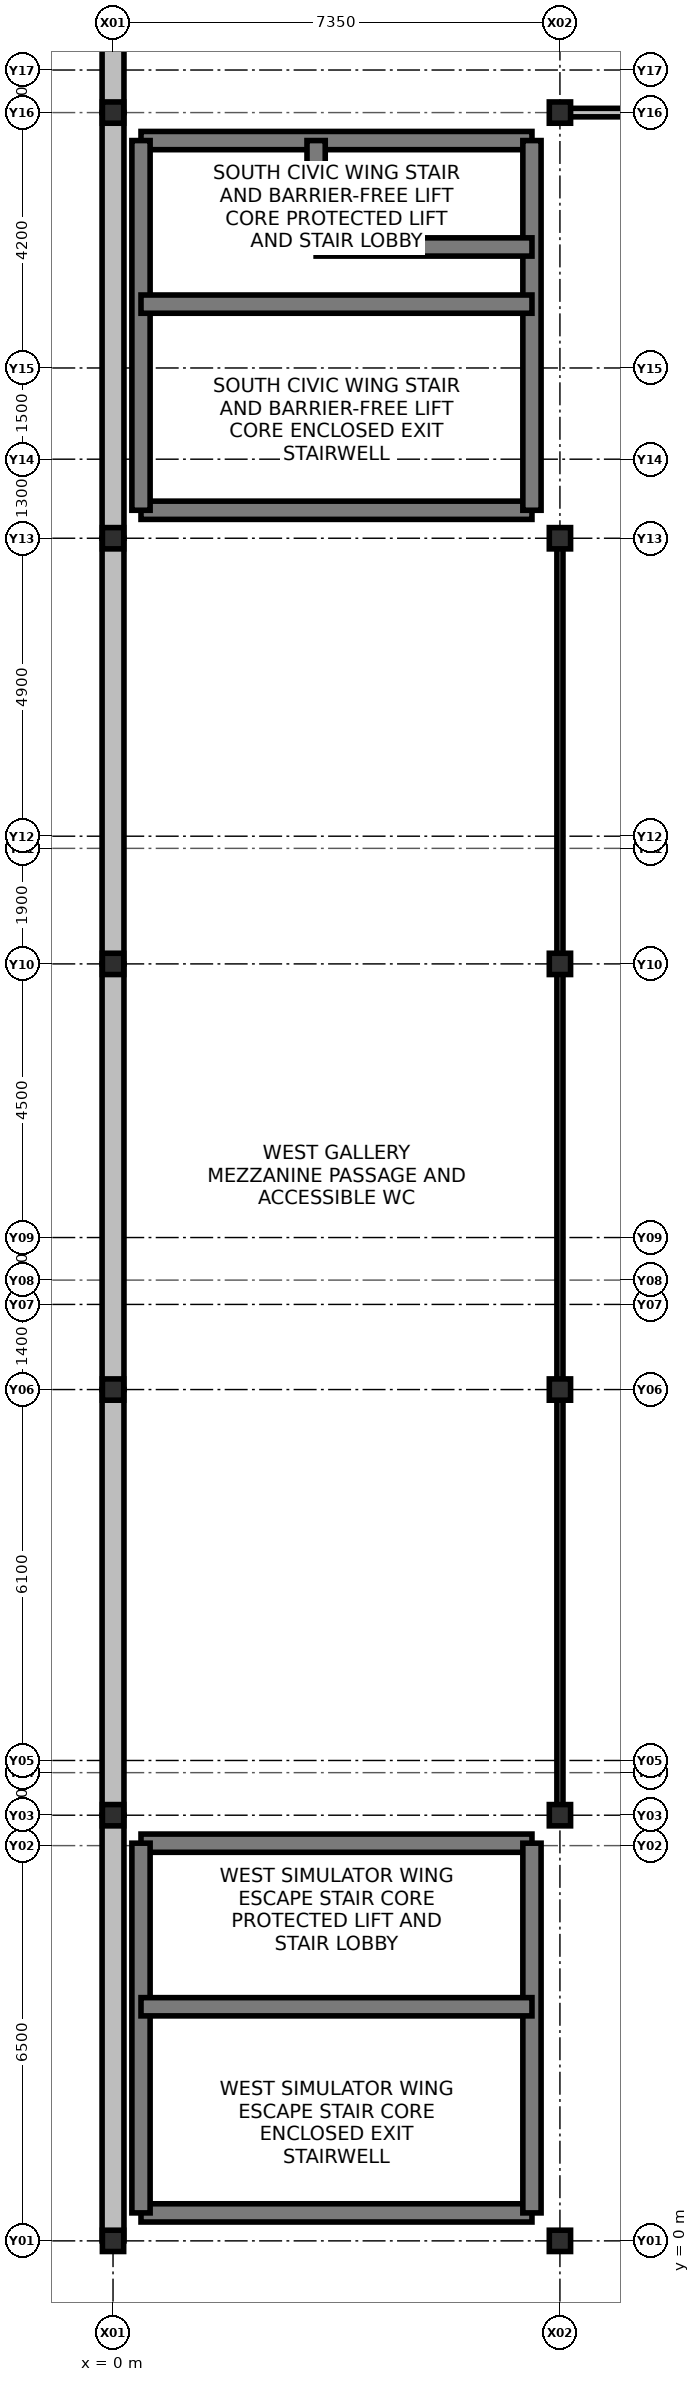
"""IFC4 building model, lengths in metres.
Left out: names, types, materials, properties, quantities, classifications, styles, units other than length and angle.
Written with IfcOpenShell. Run it as: python <this file> out.ifc"""

import sys

from ifc_helpers import new_model, si_unit, direction, frame, frame_2d, origin, origin_2d, place, context, subcontext, project, spatial, rectangle, i_section, extrude, element, fill, save


model = new_model("IFC4")
c1 = context("Model", 3, precision=1e-05, world=origin(), true_north=direction((0.0, 1.0)))
c2 = subcontext(c1, "Body", "Model", "MODEL_VIEW")
j1 = project(units=[si_unit("LENGTHUNIT", "METRE"), si_unit("PLANEANGLEUNIT", "RADIAN")], contexts=[c1])
p1 = place(None, origin())
s1 = spatial("IfcSite", under=j1, at=p1, CompositionType="ELEMENT")
p2 = place(p1, origin())
s2 = spatial("IfcBuilding", under=s1, at=p2, CompositionType="ELEMENT")
p3 = place(p2, frame((0.0, 0.0, 6.0)))
s3 = spatial("IfcBuildingStorey", under=s2, at=p3, CompositionType="ELEMENT", Elevation=6.0)
for number, where, z_axis, x_axis in (
    (1, (0.0, 0.0, 0.0), (0.0, 0.0, 1.0), (1.0, 0.0, 0.0)),
    (2, (0.0, 7.0, 0.0), (0.0, 0.0, 1.0), (1.0, 0.0, 0.0)),
    (3, (0.0, 14.0, 0.0), (0.0, 0.0, 1.0), (1.0, 0.0, 0.0)),
    (4, (0.0, 21.0, 0.0), (0.0, 0.0, 1.0), (1.0, 0.0, 0.0)),
    (5, (0.0, 28.0, 0.0), (0.0, 0.0, 1.0), (1.0, 0.0, 0.0)),
    (6, (0.0, 35.0, 0.0), (0.0, 0.0, 1.0), (1.0, 0.0, 0.0)),
    (7, (7.35, 0.0, 0.0), (0.0, 0.0, 1.0), (1.0, 0.0, 0.0)),
    (8, (7.35, 7.0, 0.0), (0.0, 0.0, 1.0), (1.0, 0.0, 0.0)),
    (9, (7.35, 14.0, 0.0), (0.0, 0.0, 1.0), (1.0, 0.0, 0.0)),
    (10, (7.35, 21.0, 0.0), (0.0, 0.0, 1.0), (1.0, 0.0, 0.0)),
    (11, (7.35, 28.0, 0.0), (0.0, 0.0, 1.0), (1.0, 0.0, 0.0)),
    (12, (7.35, 35.0, 0.0), (0.0, 0.0, 1.0), (1.0, 0.0, 0.0)),
):
    element("IfcColumn", number, at=place(p3, frame(where, z_axis=z_axis, x_axis=x_axis)), inside=s3, PredefinedType="COLUMN", context=c2, shape_type="SweptSolid", body=[
        extrude(i_section(OverallWidth=0.35, OverallDepth=0.35, WebThickness=0.012, FlangeThickness=0.019, at=origin_2d()), origin(), (0.0, 0.0, 1.0), 5.1),
    ])
p4 = place(p3, frame((0.0, 0.0, 0.0), z_axis=(0.0, 0.0, 1.0), x_axis=(0.0, 1.0, 0.0)))
e13 = element("IfcWall", 13, at=p4, inside=s3, PredefinedType="SOLIDWALL", context=c2, shape_type="SweptSolid", body=[
    extrude(rectangle(XDim=7.0, YDim=0.36, at=frame_2d((3.5, 0.0))), origin(), (0.0, 0.0, 1.0), 4.25),
])
p5 = place(p4, frame((2.2, 0.0, 0.95)))
e14 = element("IfcOpeningElement", 14, at=p5, cuts=e13, PredefinedType="OPENING", context=c2, shape_type="SweptSolid", body=[
    extrude(rectangle(XDim=2.15, YDim=1.9, at=frame_2d((1.075, 0.95))), frame((0.0, 0.19, 0.0), z_axis=(0.0, -1.0, 0.0), x_axis=(1.0, 0.0, 0.0)), (0.0, 0.0, 1.0), 0.38),
])
p6 = place(p3, frame((0.0, 7.0, 0.0), z_axis=(0.0, 0.0, 1.0), x_axis=(0.0, 1.0, 0.0)))
e15 = element("IfcWall", 15, at=p6, inside=s3, PredefinedType="SOLIDWALL", context=c2, shape_type="SweptSolid", body=[
    extrude(rectangle(XDim=7.0, YDim=0.36, at=frame_2d((3.5, 0.0))), origin(), (0.0, 0.0, 1.0), 4.25),
])
p7 = place(p6, frame((2.2, 0.0, 0.95)))
e16 = element("IfcOpeningElement", 16, at=p7, cuts=e15, PredefinedType="OPENING", context=c2, shape_type="SweptSolid", body=[
    extrude(rectangle(XDim=2.85, YDim=1.85, at=frame_2d((1.425, 0.925))), frame((0.0, 0.19, 0.0), z_axis=(0.0, -1.0, 0.0), x_axis=(1.0, 0.0, 0.0)), (0.0, 0.0, 1.0), 0.38),
])
p8 = place(p3, frame((0.0, 14.0, 0.0), z_axis=(0.0, 0.0, 1.0), x_axis=(0.0, 1.0, 0.0)))
e17 = element("IfcWall", 17, at=p8, inside=s3, PredefinedType="SOLIDWALL", context=c2, shape_type="SweptSolid", body=[
    extrude(rectangle(XDim=7.0, YDim=0.36, at=frame_2d((3.5, 0.0))), origin(), (0.0, 0.0, 1.0), 4.25),
])
p9 = place(p8, frame((2.2, 0.0, 0.95)))
e18 = element("IfcOpeningElement", 18, at=p9, cuts=e17, PredefinedType="OPENING", context=c2, shape_type="SweptSolid", body=[
    extrude(rectangle(XDim=3.5, YDim=2.0, at=frame_2d((1.75, 1.0))), frame((0.0, 0.19, 0.0), z_axis=(0.0, -1.0, 0.0), x_axis=(1.0, 0.0, 0.0)), (0.0, 0.0, 1.0), 0.38),
])
p10 = place(p3, frame((0.0, 21.0, 0.0), z_axis=(0.0, 0.0, 1.0), x_axis=(0.0, 1.0, 0.0)))
e19 = element("IfcWall", 19, at=p10, inside=s3, PredefinedType="SOLIDWALL", context=c2, shape_type="SweptSolid", body=[
    extrude(rectangle(XDim=7.0, YDim=0.36, at=frame_2d((3.5, 0.0))), origin(), (0.0, 0.0, 1.0), 4.25),
])
p11 = place(p10, frame((2.2, 0.0, 0.95)))
e20 = element("IfcOpeningElement", 20, at=p11, cuts=e19, PredefinedType="OPENING", context=c2, shape_type="SweptSolid", body=[
    extrude(rectangle(XDim=1.8, YDim=1.8, at=frame_2d((0.9, 0.9))), frame((0.0, 0.19, 0.0), z_axis=(0.0, -1.0, 0.0), x_axis=(1.0, 0.0, 0.0)), (0.0, 0.0, 1.0), 0.38),
])
p12 = place(p3, frame((0.0, 28.0, 0.0), z_axis=(0.0, 0.0, 1.0), x_axis=(0.0, 1.0, 0.0)))
e21 = element("IfcWall", 21, at=p12, inside=s3, PredefinedType="SOLIDWALL", context=c2, shape_type="SweptSolid", body=[
    extrude(rectangle(XDim=7.0, YDim=0.36, at=frame_2d((3.5, 0.0))), origin(), (0.0, 0.0, 1.0), 4.25),
])
p13 = place(p12, frame((2.2, 0.0, 0.95)))
e22 = element("IfcOpeningElement", 22, at=p13, cuts=e21, PredefinedType="OPENING", context=c2, shape_type="SweptSolid", body=[
    extrude(rectangle(XDim=2.4, YDim=2.1, at=frame_2d((1.2, 1.05))), frame((0.0, 0.19, 0.0), z_axis=(0.0, -1.0, 0.0), x_axis=(1.0, 0.0, 0.0)), (0.0, 0.0, 1.0), 0.38),
])
p14 = place(p3, frame((0.0, 35.0, 0.0), z_axis=(0.0, 0.0, 1.0), x_axis=(0.0, 1.0, 0.0)))
e23 = element("IfcWall", 23, at=p14, inside=s3, PredefinedType="SOLIDWALL", context=c2, shape_type="SweptSolid", body=[
    extrude(rectangle(XDim=7.0, YDim=0.36, at=frame_2d((3.5, 0.0))), origin(), (0.0, 0.0, 1.0), 4.25),
])
p15 = place(p14, frame((2.2, 0.0, 0.95)))
e24 = element("IfcOpeningElement", 24, at=p15, cuts=e23, PredefinedType="OPENING", context=c2, shape_type="SweptSolid", body=[
    extrude(rectangle(XDim=3.2, YDim=2.0, at=frame_2d((1.6, 1.0))), frame((0.0, 0.19, 0.0), z_axis=(0.0, -1.0, 0.0), x_axis=(1.0, 0.0, 0.0)), (0.0, 0.0, 1.0), 0.38),
])
p16 = place(p3, frame((0.46, 28.46, 0.0), z_axis=(0.0, 0.0, 1.0), x_axis=(1.0, 0.0, 0.0)))
e25 = element("IfcWall", 25, at=p16, inside=s3, PredefinedType="SHEAR", context=c2, shape_type="SweptSolid", body=[
    extrude(rectangle(XDim=6.43, YDim=0.3, at=frame_2d((3.215, 0.0))), origin(), (0.0, 0.0, 1.0), 4.82),
])
p17 = place(p3, frame((0.46, 34.54, 0.0), z_axis=(0.0, 0.0, 1.0), x_axis=(1.0, 0.0, 0.0)))
e26 = element("IfcWall", 26, at=p17, inside=s3, PredefinedType="SHEAR", context=c2, shape_type="SweptSolid", body=[
    extrude(rectangle(XDim=6.43, YDim=0.3, at=frame_2d((3.215, 0.0))), origin(), (0.0, 0.0, 1.0), 4.82),
])
p18 = place(p17, frame((0.55, 0.0, 0.0)))
e27 = element("IfcOpeningElement", 27, at=p18, cuts=e26, PredefinedType="OPENING", context=c2, shape_type="SweptSolid", body=[
    extrude(rectangle(XDim=1.5, YDim=2.2, at=frame_2d((0.75, 1.1))), frame((0.0, 0.16, 0.0), z_axis=(0.0, -1.0, 0.0), x_axis=(1.0, 0.0, 0.0)), (0.0, 0.0, 1.0), 0.32),
])
for number, where, z_axis, x_axis in (
    (28, (0.46, 28.46, 0.0), (0.0, 0.0, 1.0), (0.0, 1.0, 0.0)),
    (29, (6.89, 28.46, 0.0), (0.0, 0.0, 1.0), (0.0, 1.0, 0.0)),
):
    element("IfcWall", number, at=place(p3, frame(where, z_axis=z_axis, x_axis=x_axis)), inside=s3, PredefinedType="SHEAR", context=c2, shape_type="SweptSolid", body=[
        extrude(rectangle(XDim=6.08, YDim=0.3, at=frame_2d((3.04, 0.0))), origin(), (0.0, 0.0, 1.0), 4.82),
    ])
p19 = place(p3, frame((0.46, 31.85, 0.0), z_axis=(0.0, 0.0, 1.0), x_axis=(1.0, 0.0, 0.0)))
e30 = element("IfcWall", 30, at=p19, inside=s3, PredefinedType="SHEAR", context=c2, shape_type="SweptSolid", body=[
    extrude(rectangle(XDim=6.43, YDim=0.3, at=frame_2d((3.215, 0.0))), origin(), (0.0, 0.0, 1.0), 4.82),
])
p20 = place(p19, frame((0.185, 0.0, 0.0)))
e31 = element("IfcOpeningElement", 31, at=p20, cuts=e30, PredefinedType="OPENING", context=c2, shape_type="SweptSolid", body=[
    extrude(rectangle(XDim=1.05, YDim=2.15, at=frame_2d((0.525, 1.075))), frame((0.0, 0.16, 0.0), z_axis=(0.0, -1.0, 0.0), x_axis=(1.0, 0.0, 0.0)), (0.0, 0.0, 1.0), 0.32),
])
p21 = place(p3, frame((3.34, 32.79, 0.0), z_axis=(0.0, 0.0, 1.0), x_axis=(0.0, 1.0, 0.0)))
e32 = element("IfcWall", 32, at=p21, inside=s3, PredefinedType="SHEAR", context=c2, shape_type="SweptSolid", body=[
    extrude(rectangle(XDim=1.75, YDim=0.3, at=frame_2d((0.875, 0.0))), origin(), (0.0, 0.0, 1.0), 4.82),
])
p22 = place(p3, frame((3.34, 32.79, 0.0), z_axis=(0.0, 0.0, 1.0), x_axis=(1.0, 0.0, 0.0)))
e33 = element("IfcWall", 33, at=p22, inside=s3, PredefinedType="SHEAR", context=c2, shape_type="SweptSolid", body=[
    extrude(rectangle(XDim=3.55, YDim=0.3, at=frame_2d((1.775, 0.0))), origin(), (0.0, 0.0, 1.0), 4.82),
])
p23 = place(p22, frame((0.25, 0.0, 0.0)))
e34 = element("IfcOpeningElement", 34, at=p23, cuts=e33, PredefinedType="OPENING", context=c2, shape_type="SweptSolid", body=[
    extrude(rectangle(XDim=1.1, YDim=2.15, at=frame_2d((0.55, 1.075))), frame((0.0, 0.16, 0.0), z_axis=(0.0, -1.0, 0.0), x_axis=(1.0, 0.0, 0.0)), (0.0, 0.0, 1.0), 0.32),
])
p24 = place(p22, frame((1.75, 0.0, 0.0)))
e35 = element("IfcOpeningElement", 35, at=p24, cuts=e33, PredefinedType="OPENING", context=c2, shape_type="SweptSolid", body=[
    extrude(rectangle(XDim=1.2, YDim=2.2, at=frame_2d((0.6, 1.1))), frame((0.0, 0.16, 0.0), z_axis=(0.0, -1.0, 0.0), x_axis=(1.0, 0.0, 0.0)), (0.0, 0.0, 1.0), 0.32),
])
p25 = place(p3, frame((0.46, 0.46, 0.0), z_axis=(0.0, 0.0, 1.0), x_axis=(1.0, 0.0, 0.0)))
e36 = element("IfcWall", 36, at=p25, inside=s3, PredefinedType="SHEAR", context=c2, shape_type="SweptSolid", body=[
    extrude(rectangle(XDim=6.43, YDim=0.3, at=frame_2d((3.215, 0.0))), origin(), (0.0, 0.0, 1.0), 4.82),
])
p26 = place(p3, frame((0.46, 6.54, 0.0), z_axis=(0.0, 0.0, 1.0), x_axis=(1.0, 0.0, 0.0)))
e37 = element("IfcWall", 37, at=p26, inside=s3, PredefinedType="SHEAR", context=c2, shape_type="SweptSolid", body=[
    extrude(rectangle(XDim=6.43, YDim=0.3, at=frame_2d((3.215, 0.0))), origin(), (0.0, 0.0, 1.0), 4.82),
])
p27 = place(p26, frame((0.55, 0.0, 0.0)))
e38 = element("IfcOpeningElement", 38, at=p27, cuts=e37, PredefinedType="OPENING", context=c2, shape_type="SweptSolid", body=[
    extrude(rectangle(XDim=1.5, YDim=2.2, at=frame_2d((0.75, 1.1))), frame((0.0, 0.16, 0.0), z_axis=(0.0, -1.0, 0.0), x_axis=(1.0, 0.0, 0.0)), (0.0, 0.0, 1.0), 0.32),
])
for number, where, z_axis, x_axis in (
    (39, (0.46, 0.46, 0.0), (0.0, 0.0, 1.0), (0.0, 1.0, 0.0)),
    (40, (6.89, 0.46, 0.0), (0.0, 0.0, 1.0), (0.0, 1.0, 0.0)),
):
    element("IfcWall", number, at=place(p3, frame(where, z_axis=z_axis, x_axis=x_axis)), inside=s3, PredefinedType="SHEAR", context=c2, shape_type="SweptSolid", body=[
        extrude(rectangle(XDim=6.08, YDim=0.3, at=frame_2d((3.04, 0.0))), origin(), (0.0, 0.0, 1.0), 4.82),
    ])
p28 = place(p3, frame((0.46, 3.85, 0.0), z_axis=(0.0, 0.0, 1.0), x_axis=(1.0, 0.0, 0.0)))
e41 = element("IfcWall", 41, at=p28, inside=s3, PredefinedType="SHEAR", context=c2, shape_type="SweptSolid", body=[
    extrude(rectangle(XDim=6.43, YDim=0.3, at=frame_2d((3.215, 0.0))), origin(), (0.0, 0.0, 1.0), 4.82),
])
p29 = place(p28, frame((0.185, 0.0, 0.0)))
e42 = element("IfcOpeningElement", 42, at=p29, cuts=e41, PredefinedType="OPENING", context=c2, shape_type="SweptSolid", body=[
    extrude(rectangle(XDim=1.05, YDim=2.15, at=frame_2d((0.525, 1.075))), frame((0.0, 0.16, 0.0), z_axis=(0.0, -1.0, 0.0), x_axis=(1.0, 0.0, 0.0)), (0.0, 0.0, 1.0), 0.32),
])
p30 = place(p3, frame((7.35, 35.0, 0.0), z_axis=(0.0, 0.0, 1.0), x_axis=(1.0, 0.0, 0.0)))
e43 = element("IfcWall", 43, at=p30, inside=s3, PredefinedType="PARTITIONING", context=c2, shape_type="SweptSolid", body=[
    extrude(rectangle(XDim=14.7, YDim=0.14, at=frame_2d((7.35, 0.0))), origin(), (0.0, 0.0, 1.0), 4.05),
])
p31 = place(p30, frame((3.5, 0.0, 0.0)))
e44 = element("IfcOpeningElement", 44, at=p31, cuts=e43, PredefinedType="OPENING", context=c2, shape_type="SweptSolid", body=[
    extrude(rectangle(XDim=1.05, YDim=2.1, at=frame_2d((0.525, 1.05))), frame((0.0, 0.08, 0.0), z_axis=(0.0, -1.0, 0.0), x_axis=(1.0, 0.0, 0.0)), (0.0, 0.0, 1.0), 0.16),
])
p32 = place(p30, frame((10.0, 0.0, 0.0)))
e45 = element("IfcOpeningElement", 45, at=p32, cuts=e43, PredefinedType="OPENING", context=c2, shape_type="SweptSolid", body=[
    extrude(rectangle(XDim=1.2, YDim=2.1, at=frame_2d((0.6, 1.05))), frame((0.0, 0.08, 0.0), z_axis=(0.0, -1.0, 0.0), x_axis=(1.0, 0.0, 0.0)), (0.0, 0.0, 1.0), 0.16),
])
p33 = place(p3, frame((7.35, 7.0, 0.0), z_axis=(0.0, 0.0, 1.0), x_axis=(0.0, 1.0, 0.0)))
e46 = element("IfcWall", 46, at=p33, inside=s3, PredefinedType="PARTITIONING", context=c2, shape_type="SweptSolid", body=[
    extrude(rectangle(XDim=21.0, YDim=0.1, at=frame_2d((10.5, 0.0))), origin(), (0.0, 0.0, 1.0), 4.05),
])
p34 = place(p33, frame((3.2, 0.0, 0.0)))
e47 = element("IfcOpeningElement", 47, at=p34, cuts=e46, PredefinedType="OPENING", context=c2, shape_type="SweptSolid", body=[
    extrude(rectangle(XDim=1.1, YDim=2.1, at=frame_2d((0.55, 1.05))), frame((0.0, 0.06, 0.0), z_axis=(0.0, -1.0, 0.0), x_axis=(1.0, 0.0, 0.0)), (0.0, 0.0, 1.0), 0.12),
])
p35 = place(p5, origin())
e48 = element("IfcWindow", 48, at=p35, inside=s3, PartitioningType="SINGLE_PANEL", PredefinedType="WINDOW", context=c2, shape_type="SweptSolid", body=[
    extrude(rectangle(XDim=2.15, YDim=1.9, at=frame_2d((1.075, 0.95))), frame((0.0, 0.03, 0.0), z_axis=(0.0, -1.0, 0.0), x_axis=(1.0, 0.0, 0.0)), (0.0, 0.0, 1.0), 0.06),
])
fill(e14, e48)
p36 = place(p7, origin())
e49 = element("IfcWindow", 49, at=p36, inside=s3, PartitioningType="SINGLE_PANEL", PredefinedType="WINDOW", context=c2, shape_type="SweptSolid", body=[
    extrude(rectangle(XDim=2.85, YDim=1.85, at=frame_2d((1.425, 0.925))), frame((0.0, 0.03, 0.0), z_axis=(0.0, -1.0, 0.0), x_axis=(1.0, 0.0, 0.0)), (0.0, 0.0, 1.0), 0.06),
])
fill(e16, e49)
p37 = place(p9, origin())
e50 = element("IfcWindow", 50, at=p37, inside=s3, PartitioningType="SINGLE_PANEL", PredefinedType="WINDOW", context=c2, shape_type="SweptSolid", body=[
    extrude(rectangle(XDim=3.5, YDim=2.0, at=frame_2d((1.75, 1.0))), frame((0.0, 0.03, 0.0), z_axis=(0.0, -1.0, 0.0), x_axis=(1.0, 0.0, 0.0)), (0.0, 0.0, 1.0), 0.06),
])
fill(e18, e50)
p38 = place(p11, origin())
e51 = element("IfcWindow", 51, at=p38, inside=s3, PartitioningType="SINGLE_PANEL", PredefinedType="WINDOW", context=c2, shape_type="SweptSolid", body=[
    extrude(rectangle(XDim=1.8, YDim=1.8, at=frame_2d((0.9, 0.9))), frame((0.0, 0.03, 0.0), z_axis=(0.0, -1.0, 0.0), x_axis=(1.0, 0.0, 0.0)), (0.0, 0.0, 1.0), 0.06),
])
fill(e20, e51)
p39 = place(p13, origin())
e52 = element("IfcWindow", 52, at=p39, inside=s3, PartitioningType="SINGLE_PANEL", PredefinedType="WINDOW", context=c2, shape_type="SweptSolid", body=[
    extrude(rectangle(XDim=2.4, YDim=2.1, at=frame_2d((1.2, 1.05))), frame((0.0, 0.03, 0.0), z_axis=(0.0, -1.0, 0.0), x_axis=(1.0, 0.0, 0.0)), (0.0, 0.0, 1.0), 0.06),
])
fill(e22, e52)
p40 = place(p20, origin())
e53 = element("IfcDoor", 53, at=p40, inside=s3, OperationType="SINGLE_SWING_RIGHT", PredefinedType="DOOR", context=c2, shape_type="SweptSolid", body=[
    extrude(rectangle(XDim=1.05, YDim=2.15, at=frame_2d((0.525, 1.075))), frame((0.0, 0.025, 0.0), z_axis=(0.0, -1.0, 0.0), x_axis=(1.0, 0.0, 0.0)), (0.0, 0.0, 1.0), 0.05),
])
fill(e31, e53)
p41 = place(p18, origin())
e54 = element("IfcDoor", 54, at=p41, inside=s3, OperationType="DOUBLE_DOOR_SINGLE_SWING", PredefinedType="DOOR", context=c2, shape_type="SweptSolid", body=[
    extrude(rectangle(XDim=1.5, YDim=2.2, at=frame_2d((0.75, 1.1))), frame((0.0, 0.025, 0.0), z_axis=(0.0, -1.0, 0.0), x_axis=(1.0, 0.0, 0.0)), (0.0, 0.0, 1.0), 0.05),
])
fill(e27, e54)
p42 = place(p23, origin())
e55 = element("IfcDoor", 55, at=p42, inside=s3, OperationType="SLIDING_TO_LEFT", PredefinedType="DOOR", context=c2, shape_type="SweptSolid", body=[
    extrude(rectangle(XDim=1.1, YDim=2.15, at=frame_2d((0.55, 1.075))), frame((0.0, 0.025, 0.0), z_axis=(0.0, -1.0, 0.0), x_axis=(1.0, 0.0, 0.0)), (0.0, 0.0, 1.0), 0.05),
])
fill(e34, e55)
p43 = place(p24, origin())
e56 = element("IfcDoor", 56, at=p43, inside=s3, OperationType="SLIDING_TO_RIGHT", PredefinedType="DOOR", context=c2, shape_type="SweptSolid", body=[
    extrude(rectangle(XDim=1.2, YDim=2.2, at=frame_2d((0.6, 1.1))), frame((0.0, 0.025, 0.0), z_axis=(0.0, -1.0, 0.0), x_axis=(1.0, 0.0, 0.0)), (0.0, 0.0, 1.0), 0.05),
])
fill(e35, e56)
p44 = place(p29, origin())
e57 = element("IfcDoor", 57, at=p44, inside=s3, OperationType="SINGLE_SWING_RIGHT", PredefinedType="DOOR", context=c2, shape_type="SweptSolid", body=[
    extrude(rectangle(XDim=1.05, YDim=2.15, at=frame_2d((0.525, 1.075))), frame((0.0, 0.025, 0.0), z_axis=(0.0, -1.0, 0.0), x_axis=(1.0, 0.0, 0.0)), (0.0, 0.0, 1.0), 0.05),
])
fill(e42, e57)
p45 = place(p27, origin())
e58 = element("IfcDoor", 58, at=p45, inside=s3, OperationType="DOUBLE_DOOR_SINGLE_SWING", PredefinedType="DOOR", context=c2, shape_type="SweptSolid", body=[
    extrude(rectangle(XDim=1.5, YDim=2.2, at=frame_2d((0.75, 1.1))), frame((0.0, 0.025, 0.0), z_axis=(0.0, -1.0, 0.0), x_axis=(1.0, 0.0, 0.0)), (0.0, 0.0, 1.0), 0.05),
])
fill(e38, e58)
p46 = place(p34, origin())
e59 = element("IfcDoor", 59, at=p46, inside=s3, OperationType="SINGLE_SWING_RIGHT", PredefinedType="DOOR", context=c2, shape_type="SweptSolid", body=[
    extrude(rectangle(XDim=1.1, YDim=2.1, at=frame_2d((0.55, 1.05))), frame((0.0, 0.025, 0.0), z_axis=(0.0, -1.0, 0.0), x_axis=(1.0, 0.0, 0.0)), (0.0, 0.0, 1.0), 0.05),
])
fill(e47, e59)
save(model, sys.argv[1])
